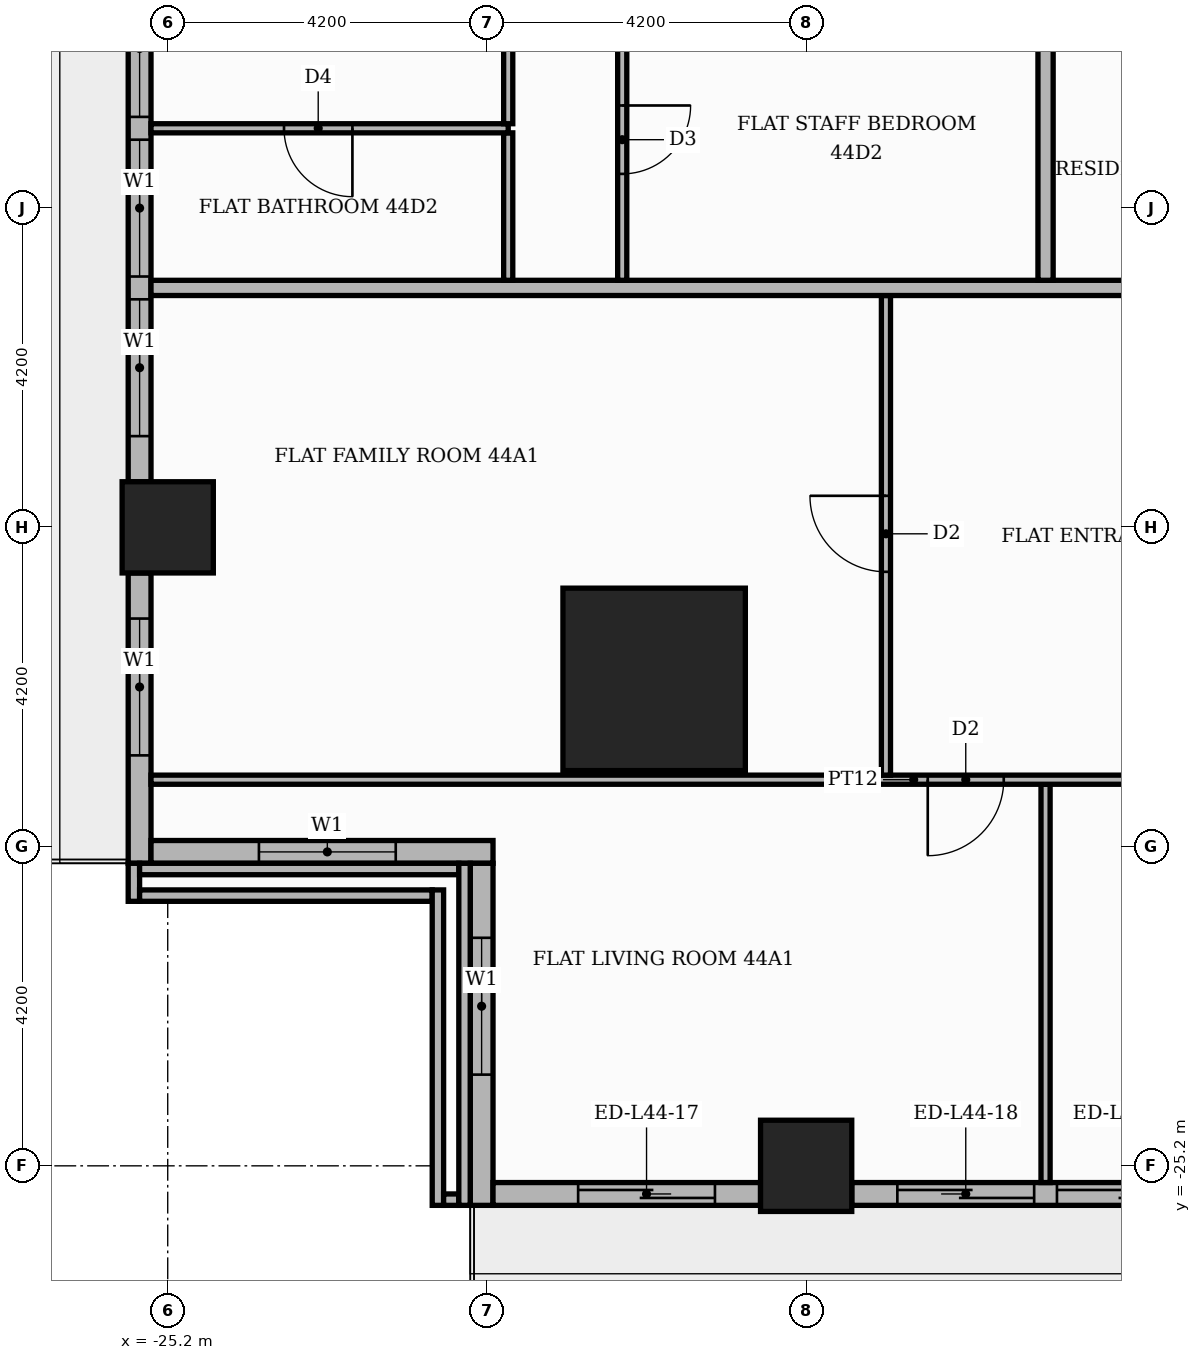
"""IFC4 building model, lengths in metres.
Left out: names, types, materials, properties, quantities, classifications, styles, units other than length and angle.
Written with IfcOpenShell. Run it as: python <this file> out.ifc"""

import sys

from ifc_helpers import new_model, si_unit, direction, frame, frame_2d, origin, origin_2d, place, context, subcontext, project, spatial, rectangle, extrude, element, fill, save


model = new_model("IFC4")
c1 = context("Model", 3, precision=1e-05, world=origin(), true_north=direction((0.0, 1.0)))
c2 = subcontext(c1, "Body", "Model", "MODEL_VIEW")
j1 = project(units=[si_unit("LENGTHUNIT", "METRE"), si_unit("PLANEANGLEUNIT", "RADIAN")], contexts=[c1])
p1 = place(None, origin())
s1 = spatial("IfcSite", under=j1, at=p1, CompositionType="ELEMENT")
p2 = place(p1, origin())
s2 = spatial("IfcBuilding", under=s1, at=p2, CompositionType="ELEMENT")
p3 = place(p2, frame((0.0, 0.0, 188.4)))
s3 = spatial("IfcBuildingStorey", under=s2, at=p3, CompositionType="ELEMENT", Elevation=188.4)
p4 = place(p3, frame((-18.8, -18.8, 0.0), z_axis=(0.0, 0.0, 1.0), x_axis=(1.0, 0.0, 0.0)))
e1 = element("IfcColumn", 1, at=p4, inside=s3, PredefinedType="COLUMN", context=c2, shape_type="SweptSolid", body=[
    extrude(rectangle(XDim=2.4, YDim=2.4, at=origin_2d()), origin(), (0.0, 0.0, 1.0), 3.9),
])
for number, where, z_axis, x_axis in (
    (2, (-16.8, -25.2, 0.0), (0.0, 0.0, 1.0), (1.0, 0.0, 0.0)),
    (3, (-25.2, -16.8, 0.0), (0.0, 0.0, 1.0), (1.0, 0.0, 0.0)),
):
    element("IfcColumn", number, at=place(p3, frame(where, z_axis=z_axis, x_axis=x_axis)), inside=s3, PredefinedType="COLUMN", context=c2, shape_type="SweptSolid", body=[
        extrude(rectangle(XDim=1.2, YDim=1.2, at=origin_2d()), origin(), (0.0, 0.0, 1.0), 3.9),
    ])
p5 = place(p3, frame((-25.57, -9.0, 0.0), z_axis=(0.0, 0.0, 1.0), x_axis=(0.0, -1.0, 0.0)))
e4 = element("IfcWall", 4, at=p5, inside=s3, PredefinedType="STANDARD", context=c2, shape_type="SweptSolid", body=[
    extrude(rectangle(XDim=7.2, YDim=0.3, at=frame_2d((3.6, 0.0))), origin(), (0.0, 0.0, 1.0), 3.48),
])
p6 = place(p5, frame((0.6, 0.0, 0.9)))
e5 = element("IfcOpeningElement", 5, at=p6, cuts=e4, PredefinedType="OPENING", context=c2, shape_type="SweptSolid", body=[
    extrude(rectangle(XDim=1.8, YDim=2.1, at=frame_2d((0.9, 1.05))), frame((0.0, 0.16, 0.0), z_axis=(0.0, -1.0, 0.0), x_axis=(1.0, 0.0, 0.0)), (0.0, 0.0, 1.0), 0.32),
])
p7 = place(p5, frame((2.7, 0.0, 0.9)))
e6 = element("IfcOpeningElement", 6, at=p7, cuts=e4, PredefinedType="OPENING", context=c2, shape_type="SweptSolid", body=[
    extrude(rectangle(XDim=1.8, YDim=2.1, at=frame_2d((0.9, 1.05))), frame((0.0, 0.16, 0.0), z_axis=(0.0, -1.0, 0.0), x_axis=(1.0, 0.0, 0.0)), (0.0, 0.0, 1.0), 0.32),
])
p8 = place(p5, frame((4.8, 0.0, 0.9)))
e7 = element("IfcOpeningElement", 7, at=p8, cuts=e4, PredefinedType="OPENING", context=c2, shape_type="SweptSolid", body=[
    extrude(rectangle(XDim=1.8, YDim=2.1, at=frame_2d((0.9, 1.05))), frame((0.0, 0.16, 0.0), z_axis=(0.0, -1.0, 0.0), x_axis=(1.0, 0.0, 0.0)), (0.0, 0.0, 1.0), 0.32),
])
p9 = place(p3, frame((-25.57, -17.4, 0.0), z_axis=(0.0, 0.0, 1.0), x_axis=(0.0, -1.0, 0.0)))
e8 = element("IfcWall", 8, at=p9, inside=s3, PredefinedType="STANDARD", context=c2, shape_type="SweptSolid", body=[
    extrude(rectangle(XDim=3.82, YDim=0.3, at=frame_2d((1.91, 0.0))), origin(), (0.0, 0.0, 1.0), 3.48),
])
p10 = place(p9, frame((0.6, 0.0, 0.9)))
e9 = element("IfcOpeningElement", 9, at=p10, cuts=e8, PredefinedType="OPENING", context=c2, shape_type="SweptSolid", body=[
    extrude(rectangle(XDim=1.8, YDim=2.1, at=frame_2d((0.9, 1.05))), frame((0.0, 0.16, 0.0), z_axis=(0.0, -1.0, 0.0), x_axis=(1.0, 0.0, 0.0)), (0.0, 0.0, 1.0), 0.32),
])
p11 = place(p3, frame((-25.42, -21.07, 0.0), z_axis=(0.0, 0.0, 1.0), x_axis=(1.0, 0.0, 0.0)))
e10 = element("IfcWall", 10, at=p11, inside=s3, PredefinedType="STANDARD", context=c2, shape_type="SweptSolid", body=[
    extrude(rectangle(XDim=4.5, YDim=0.3, at=frame_2d((2.25, 0.0))), origin(), (0.0, 0.0, 1.0), 3.48),
])
p12 = place(p11, frame((1.42, 0.0, 0.9)))
e11 = element("IfcOpeningElement", 11, at=p12, cuts=e10, PredefinedType="OPENING", context=c2, shape_type="SweptSolid", body=[
    extrude(rectangle(XDim=1.8, YDim=2.1, at=frame_2d((0.9, 1.05))), frame((0.0, 0.16, 0.0), z_axis=(0.0, -1.0, 0.0), x_axis=(1.0, 0.0, 0.0)), (0.0, 0.0, 1.0), 0.32),
])
p13 = place(p3, frame((-21.07, -21.22, 0.0), z_axis=(0.0, 0.0, 1.0), x_axis=(0.0, -1.0, 0.0)))
e12 = element("IfcWall", 12, at=p13, inside=s3, PredefinedType="STANDARD", context=c2, shape_type="SweptSolid", body=[
    extrude(rectangle(XDim=4.5, YDim=0.3, at=frame_2d((2.25, 0.0))), origin(), (0.0, 0.0, 1.0), 3.48),
])
p14 = place(p13, frame((0.98, 0.0, 0.9)))
e13 = element("IfcOpeningElement", 13, at=p14, cuts=e12, PredefinedType="OPENING", context=c2, shape_type="SweptSolid", body=[
    extrude(rectangle(XDim=1.8, YDim=2.1, at=frame_2d((0.9, 1.05))), frame((0.0, 0.16, 0.0), z_axis=(0.0, -1.0, 0.0), x_axis=(1.0, 0.0, 0.0)), (0.0, 0.0, 1.0), 0.32),
])
p15 = place(p3, frame((-20.92, -25.57, 0.0), z_axis=(0.0, 0.0, 1.0), x_axis=(1.0, 0.0, 0.0)))
e14 = element("IfcWall", 14, at=p15, inside=s3, PredefinedType="STANDARD", context=c2, shape_type="SweptSolid", body=[
    extrude(rectangle(XDim=3.52, YDim=0.3, at=frame_2d((1.76, 0.0))), origin(), (0.0, 0.0, 1.0), 3.48),
])
p16 = place(p15, frame((1.12, 0.0, 0.0)))
e15 = element("IfcOpeningElement", 15, at=p16, cuts=e14, PredefinedType="OPENING", context=c2, shape_type="SweptSolid", body=[
    extrude(rectangle(XDim=1.8, YDim=2.4, at=frame_2d((0.9, 1.2))), frame((0.0, 0.16, 0.0), z_axis=(0.0, -1.0, 0.0), x_axis=(1.0, 0.0, 0.0)), (0.0, 0.0, 1.0), 0.32),
])
p17 = place(p3, frame((-16.2, -25.57, 0.0), z_axis=(0.0, 0.0, 1.0), x_axis=(1.0, 0.0, 0.0)))
e16 = element("IfcWall", 16, at=p17, inside=s3, PredefinedType="STANDARD", context=c2, shape_type="SweptSolid", body=[
    extrude(rectangle(XDim=7.2, YDim=0.3, at=frame_2d((3.6, 0.0))), origin(), (0.0, 0.0, 1.0), 3.48),
])
p18 = place(p17, frame((0.6, 0.0, 0.0)))
e17 = element("IfcOpeningElement", 17, at=p18, cuts=e16, PredefinedType="OPENING", context=c2, shape_type="SweptSolid", body=[
    extrude(rectangle(XDim=1.8, YDim=2.4, at=frame_2d((0.9, 1.2))), frame((0.0, 0.16, 0.0), z_axis=(0.0, -1.0, 0.0), x_axis=(1.0, 0.0, 0.0)), (0.0, 0.0, 1.0), 0.32),
])
p19 = place(p17, frame((2.7, 0.0, 0.0)))
e18 = element("IfcOpeningElement", 18, at=p19, cuts=e16, PredefinedType="OPENING", context=c2, shape_type="SweptSolid", body=[
    extrude(rectangle(XDim=1.8, YDim=2.4, at=frame_2d((0.9, 1.2))), frame((0.0, 0.16, 0.0), z_axis=(0.0, -1.0, 0.0), x_axis=(1.0, 0.0, 0.0)), (0.0, 0.0, 1.0), 0.32),
])
p20 = place(p17, frame((4.8, 0.0, 0.9)))
e19 = element("IfcOpeningElement", 19, at=p20, cuts=e16, PredefinedType="OPENING", context=c2, shape_type="SweptSolid", body=[
    extrude(rectangle(XDim=1.8, YDim=2.1, at=frame_2d((0.9, 1.05))), frame((0.0, 0.16, 0.0), z_axis=(0.0, -1.0, 0.0), x_axis=(1.0, 0.0, 0.0)), (0.0, 0.0, 1.0), 0.32),
])
p21 = place(p3, frame((-25.645, -21.72, 0.0), z_axis=(0.0, 0.0, 1.0), x_axis=(0.0, 1.0, 0.0)))
e20 = element("IfcWall", 20, at=p21, inside=s3, PredefinedType="PARAPET", context=c2, shape_type="SweptSolid", body=[
    extrude(rectangle(XDim=0.5, YDim=0.15, at=frame_2d((0.25, 0.0))), origin(), (0.0, 0.0, 1.0), 1.1),
])
p22 = place(p3, frame((-25.57, -21.645, 0.0), z_axis=(0.0, 0.0, 1.0), x_axis=(1.0, 0.0, 0.0)))
e21 = element("IfcWall", 21, at=p22, inside=s3, PredefinedType="PARAPET", context=c2, shape_type="SweptSolid", body=[
    extrude(rectangle(XDim=3.85, YDim=0.15, at=frame_2d((1.925, 0.0))), origin(), (0.0, 0.0, 1.0), 1.1),
])
p23 = place(p3, frame((-25.57, -21.295, 0.0), z_axis=(0.0, 0.0, 1.0), x_axis=(1.0, 0.0, 0.0)))
e22 = element("IfcWall", 22, at=p23, inside=s3, PredefinedType="PARAPET", context=c2, shape_type="SweptSolid", body=[
    extrude(rectangle(XDim=4.2, YDim=0.15, at=frame_2d((2.1, 0.0))), origin(), (0.0, 0.0, 1.0), 1.1),
])
p24 = place(p3, frame((-21.645, -25.72, 0.0), z_axis=(0.0, 0.0, 1.0), x_axis=(0.0, 1.0, 0.0)))
e23 = element("IfcWall", 23, at=p24, inside=s3, PredefinedType="PARAPET", context=c2, shape_type="SweptSolid", body=[
    extrude(rectangle(XDim=4.15, YDim=0.15, at=frame_2d((2.075, 0.0))), origin(), (0.0, 0.0, 1.0), 1.1),
])
p25 = place(p3, frame((-21.57, -25.645, 0.0), z_axis=(0.0, 0.0, 1.0), x_axis=(1.0, 0.0, 0.0)))
e24 = element("IfcWall", 24, at=p25, inside=s3, PredefinedType="PARAPET", context=c2, shape_type="SweptSolid", body=[
    extrude(rectangle(XDim=0.2, YDim=0.15, at=frame_2d((0.1, 0.0))), origin(), (0.0, 0.0, 1.0), 1.1),
])
p26 = place(p3, frame((-21.295, -25.72, 0.0), z_axis=(0.0, 0.0, 1.0), x_axis=(0.0, 1.0, 0.0)))
e25 = element("IfcWall", 25, at=p26, inside=s3, PredefinedType="PARAPET", context=c2, shape_type="SweptSolid", body=[
    extrude(rectangle(XDim=4.5, YDim=0.15, at=frame_2d((2.25, 0.0))), origin(), (0.0, 0.0, 1.0), 1.1),
])
p27 = place(p3, frame((-13.65, -25.42, 0.0), z_axis=(0.0, 0.0, 1.0), x_axis=(0.0, 1.0, 0.0)))
e26 = element("IfcWall", 26, at=p27, inside=s3, PredefinedType="PARTITIONING", context=c2, shape_type="SweptSolid", body=[
    extrude(rectangle(XDim=5.24, YDim=0.12, at=frame_2d((2.62, 0.0))), origin(), (0.0, 0.0, 1.0), 3.48),
])
p28 = place(p3, frame((-25.42, -20.12, 0.0), z_axis=(0.0, 0.0, 1.0), x_axis=(1.0, 0.0, 0.0)))
e27 = element("IfcWall", 27, at=p28, inside=s3, PredefinedType="PARTITIONING", context=c2, shape_type="SweptSolid", body=[
    extrude(rectangle(XDim=20.07, YDim=0.12, at=frame_2d((10.035, 0.0))), origin(), (0.0, 0.0, 1.0), 3.48),
])
p29 = place(p28, frame((10.22, 0.0, 0.0)))
e28 = element("IfcOpeningElement", 28, at=p29, cuts=e27, PredefinedType="OPENING", context=c2, shape_type="SweptSolid", body=[
    extrude(rectangle(XDim=1.0, YDim=2.1, at=frame_2d((0.5, 1.05))), frame((0.0, 0.07, 0.0), z_axis=(0.0, -1.0, 0.0), x_axis=(1.0, 0.0, 0.0)), (0.0, 0.0, 1.0), 0.14),
])
p30 = place(p28, frame((13.42, 0.0, 0.0)))
e29 = element("IfcOpeningElement", 29, at=p30, cuts=e27, PredefinedType="OPENING", context=c2, shape_type="SweptSolid", body=[
    extrude(rectangle(XDim=0.9, YDim=2.1, at=frame_2d((0.45, 1.05))), frame((0.0, 0.07, 0.0), z_axis=(0.0, -1.0, 0.0), x_axis=(1.0, 0.0, 0.0)), (0.0, 0.0, 1.0), 0.14),
])
p31 = place(p3, frame((-15.75, -20.06, 0.0), z_axis=(0.0, 0.0, 1.0), x_axis=(0.0, 1.0, 0.0)))
e30 = element("IfcWall", 30, at=p31, inside=s3, PredefinedType="PARTITIONING", context=c2, shape_type="SweptSolid", body=[
    extrude(rectangle(XDim=6.31, YDim=0.12, at=frame_2d((3.155, 0.0))), origin(), (0.0, 0.0, 1.0), 3.48),
])
p32 = place(p31, frame((2.675, 0.0, 0.0)))
e31 = element("IfcOpeningElement", 31, at=p32, cuts=e30, PredefinedType="OPENING", context=c2, shape_type="SweptSolid", body=[
    extrude(rectangle(XDim=1.0, YDim=2.1, at=frame_2d((0.5, 1.05))), frame((0.0, 0.07, 0.0), z_axis=(0.0, -1.0, 0.0), x_axis=(1.0, 0.0, 0.0)), (0.0, 0.0, 1.0), 0.14),
])
p33 = place(p3, frame((-25.42, -13.65, 0.0), z_axis=(0.0, 0.0, 1.0), x_axis=(1.0, 0.0, 0.0)))
e32 = element("IfcWall", 32, at=p33, inside=s3, PredefinedType="PARTITIONING", context=c2, shape_type="SweptSolid", body=[
    extrude(rectangle(XDim=39.07, YDim=0.2, at=frame_2d((19.535, 0.0))), origin(), (0.0, 0.0, 1.0), 3.48),
])
p34 = place(p33, frame((13.32, 0.0, 0.0)))
e33 = element("IfcOpeningElement", 33, at=p34, cuts=e32, PredefinedType="OPENING", context=c2, shape_type="SweptSolid", body=[
    extrude(rectangle(XDim=1.1, YDim=2.4, at=frame_2d((0.55, 1.2))), frame((0.0, 0.11, 0.0), z_axis=(0.0, -1.0, 0.0), x_axis=(1.0, 0.0, 0.0)), (0.0, 0.0, 1.0), 0.22),
])
p35 = place(p33, frame((21.72, 0.0, 0.0)))
e34 = element("IfcOpeningElement", 34, at=p35, cuts=e32, PredefinedType="OPENING", context=c2, shape_type="SweptSolid", body=[
    extrude(rectangle(XDim=1.1, YDim=2.4, at=frame_2d((0.55, 1.2))), frame((0.0, 0.11, 0.0), z_axis=(0.0, -1.0, 0.0), x_axis=(1.0, 0.0, 0.0)), (0.0, 0.0, 1.0), 0.22),
])
p36 = place(p3, frame((-20.72, -13.55, 0.0), z_axis=(0.0, 0.0, 1.0), x_axis=(0.0, 1.0, 0.0)))
e35 = element("IfcWall", 35, at=p36, inside=s3, PredefinedType="PARTITIONING", context=c2, shape_type="SweptSolid", body=[
    extrude(rectangle(XDim=1.94, YDim=0.12, at=frame_2d((0.97, 0.0))), origin(), (0.0, 0.0, 1.0), 3.48),
])
p37 = place(p3, frame((-19.22, -13.55, 0.0), z_axis=(0.0, 0.0, 1.0), x_axis=(0.0, 1.0, 0.0)))
e36 = element("IfcWall", 36, at=p37, inside=s3, PredefinedType="PARTITIONING", context=c2, shape_type="SweptSolid", body=[
    extrude(rectangle(XDim=3.74, YDim=0.12, at=frame_2d((1.87, 0.0))), origin(), (0.0, 0.0, 1.0), 3.48),
])
p38 = place(p37, frame((1.4, 0.0, 0.0)))
e37 = element("IfcOpeningElement", 37, at=p38, cuts=e36, PredefinedType="OPENING", context=c2, shape_type="SweptSolid", body=[
    extrude(rectangle(XDim=0.9, YDim=2.1, at=frame_2d((0.45, 1.05))), frame((0.0, 0.07, 0.0), z_axis=(0.0, -1.0, 0.0), x_axis=(1.0, 0.0, 0.0)), (0.0, 0.0, 1.0), 0.14),
])
p39 = place(p3, frame((-13.65, -13.55, 0.0), z_axis=(0.0, 0.0, 1.0), x_axis=(0.0, 1.0, 0.0)))
e38 = element("IfcWall", 38, at=p39, inside=s3, PredefinedType="PARTITIONING", context=c2, shape_type="SweptSolid", body=[
    extrude(rectangle(XDim=18.7, YDim=0.2, at=frame_2d((9.35, 0.0))), origin(), (0.0, 0.0, 1.0), 3.48),
])
p40 = place(p39, frame((14.05, 0.0, 0.0)))
e39 = element("IfcOpeningElement", 39, at=p40, cuts=e38, PredefinedType="OPENING", context=c2, shape_type="SweptSolid", body=[
    extrude(rectangle(XDim=1.1, YDim=2.4, at=frame_2d((0.55, 1.2))), frame((0.0, 0.11, 0.0), z_axis=(0.0, -1.0, 0.0), x_axis=(1.0, 0.0, 0.0)), (0.0, 0.0, 1.0), 0.22),
])
p41 = place(p3, frame((-25.42, -11.55, 0.0), z_axis=(0.0, 0.0, 1.0), x_axis=(1.0, 0.0, 0.0)))
e40 = element("IfcWall", 40, at=p41, inside=s3, PredefinedType="PARTITIONING", context=c2, shape_type="SweptSolid", body=[
    extrude(rectangle(XDim=4.7, YDim=0.12, at=frame_2d((2.35, 0.0))), origin(), (0.0, 0.0, 1.0), 3.48),
])
p42 = place(p41, frame((1.75, 0.0, 0.0)))
e41 = element("IfcOpeningElement", 41, at=p42, cuts=e40, PredefinedType="OPENING", context=c2, shape_type="SweptSolid", body=[
    extrude(rectangle(XDim=0.9, YDim=2.1, at=frame_2d((0.45, 1.05))), frame((0.0, 0.07, 0.0), z_axis=(0.0, -1.0, 0.0), x_axis=(1.0, 0.0, 0.0)), (0.0, 0.0, 1.0), 0.14),
])
p43 = place(p3, frame((-20.72, -11.49, 0.0), z_axis=(0.0, 0.0, 1.0), x_axis=(0.0, 1.0, 0.0)))
e42 = element("IfcWall", 42, at=p43, inside=s3, PredefinedType="PARTITIONING", context=c2, shape_type="SweptSolid", body=[
    extrude(rectangle(XDim=1.98, YDim=0.12, at=frame_2d((0.99, 0.0))), origin(), (0.0, 0.0, 1.0), 3.48),
])
p44 = place(p6, origin())
e43 = element("IfcWindow", 43, at=p44, inside=s3, PartitioningType="SINGLE_PANEL", PredefinedType="WINDOW", context=c2, shape_type="SweptSolid", body=[
    extrude(rectangle(XDim=1.8, YDim=2.1, at=frame_2d((0.9, 1.05))), frame((0.0, 0.03, 0.0), z_axis=(0.0, -1.0, 0.0), x_axis=(1.0, 0.0, 0.0)), (0.0, 0.0, 1.0), 0.06),
])
fill(e5, e43)
p45 = place(p7, origin())
e44 = element("IfcWindow", 44, at=p45, inside=s3, PartitioningType="SINGLE_PANEL", PredefinedType="WINDOW", context=c2, shape_type="SweptSolid", body=[
    extrude(rectangle(XDim=1.8, YDim=2.1, at=frame_2d((0.9, 1.05))), frame((0.0, 0.03, 0.0), z_axis=(0.0, -1.0, 0.0), x_axis=(1.0, 0.0, 0.0)), (0.0, 0.0, 1.0), 0.06),
])
fill(e6, e44)
p46 = place(p8, origin())
e45 = element("IfcWindow", 45, at=p46, inside=s3, PartitioningType="SINGLE_PANEL", PredefinedType="WINDOW", context=c2, shape_type="SweptSolid", body=[
    extrude(rectangle(XDim=1.8, YDim=2.1, at=frame_2d((0.9, 1.05))), frame((0.0, 0.03, 0.0), z_axis=(0.0, -1.0, 0.0), x_axis=(1.0, 0.0, 0.0)), (0.0, 0.0, 1.0), 0.06),
])
fill(e7, e45)
p47 = place(p10, origin())
e46 = element("IfcWindow", 46, at=p47, inside=s3, PartitioningType="SINGLE_PANEL", PredefinedType="WINDOW", context=c2, shape_type="SweptSolid", body=[
    extrude(rectangle(XDim=1.8, YDim=2.1, at=frame_2d((0.9, 1.05))), frame((0.0, 0.03, 0.0), z_axis=(0.0, -1.0, 0.0), x_axis=(1.0, 0.0, 0.0)), (0.0, 0.0, 1.0), 0.06),
])
fill(e9, e46)
p48 = place(p12, origin())
e47 = element("IfcWindow", 47, at=p48, inside=s3, PartitioningType="SINGLE_PANEL", PredefinedType="WINDOW", context=c2, shape_type="SweptSolid", body=[
    extrude(rectangle(XDim=1.8, YDim=2.1, at=frame_2d((0.9, 1.05))), frame((0.0, 0.03, 0.0), z_axis=(0.0, -1.0, 0.0), x_axis=(1.0, 0.0, 0.0)), (0.0, 0.0, 1.0), 0.06),
])
fill(e11, e47)
p49 = place(p14, origin())
e48 = element("IfcWindow", 48, at=p49, inside=s3, PartitioningType="SINGLE_PANEL", PredefinedType="WINDOW", context=c2, shape_type="SweptSolid", body=[
    extrude(rectangle(XDim=1.8, YDim=2.1, at=frame_2d((0.9, 1.05))), frame((0.0, 0.03, 0.0), z_axis=(0.0, -1.0, 0.0), x_axis=(1.0, 0.0, 0.0)), (0.0, 0.0, 1.0), 0.06),
])
fill(e13, e48)
p50 = place(p16, origin())
e49 = element("IfcDoor", 49, at=p50, inside=s3, OperationType="SLIDING_TO_RIGHT", PredefinedType="DOOR", context=c2, shape_type="SweptSolid", body=[
    extrude(rectangle(XDim=1.8, YDim=2.4, at=frame_2d((0.9, 1.2))), frame((0.0, 0.025, 0.0), z_axis=(0.0, -1.0, 0.0), x_axis=(1.0, 0.0, 0.0)), (0.0, 0.0, 1.0), 0.05),
])
fill(e15, e49)
p51 = place(p18, origin())
e50 = element("IfcDoor", 50, at=p51, inside=s3, OperationType="SLIDING_TO_LEFT", PredefinedType="DOOR", context=c2, shape_type="SweptSolid", body=[
    extrude(rectangle(XDim=1.8, YDim=2.4, at=frame_2d((0.9, 1.2))), frame((0.0, 0.025, 0.0), z_axis=(0.0, -1.0, 0.0), x_axis=(1.0, 0.0, 0.0)), (0.0, 0.0, 1.0), 0.05),
])
fill(e17, e50)
p52 = place(p19, origin())
e51 = element("IfcDoor", 51, at=p52, inside=s3, OperationType="SLIDING_TO_RIGHT", PredefinedType="DOOR", context=c2, shape_type="SweptSolid", body=[
    extrude(rectangle(XDim=1.8, YDim=2.4, at=frame_2d((0.9, 1.2))), frame((0.0, 0.025, 0.0), z_axis=(0.0, -1.0, 0.0), x_axis=(1.0, 0.0, 0.0)), (0.0, 0.0, 1.0), 0.05),
])
fill(e18, e51)
p53 = place(p32, origin())
e52 = element("IfcDoor", 52, at=p53, inside=s3, OperationType="SINGLE_SWING_RIGHT", PredefinedType="DOOR", context=c2, shape_type="SweptSolid", body=[
    extrude(rectangle(XDim=1.0, YDim=2.1, at=frame_2d((0.5, 1.05))), frame((0.0, 0.025, 0.0), z_axis=(0.0, -1.0, 0.0), x_axis=(1.0, 0.0, 0.0)), (0.0, 0.0, 1.0), 0.05),
])
fill(e31, e52)
p54 = place(p29, frame((1.0, 0.0, 0.0), z_axis=(0.0, 0.0, 1.0), x_axis=(-1.0, 0.0, 0.0)))
e53 = element("IfcDoor", 53, at=p54, inside=s3, OperationType="SINGLE_SWING_LEFT", PredefinedType="DOOR", context=c2, shape_type="SweptSolid", body=[
    extrude(rectangle(XDim=1.0, YDim=2.1, at=frame_2d((0.5, 1.05))), frame((0.0, 0.025, 0.0), z_axis=(0.0, -1.0, 0.0), x_axis=(1.0, 0.0, 0.0)), (0.0, 0.0, 1.0), 0.05),
])
fill(e28, e53)
p55 = place(p38, frame((0.9, 0.0, 0.0), z_axis=(0.0, 0.0, 1.0), x_axis=(-1.0, 0.0, 0.0)))
e54 = element("IfcDoor", 54, at=p55, inside=s3, OperationType="SINGLE_SWING_RIGHT", PredefinedType="DOOR", context=c2, shape_type="SweptSolid", body=[
    extrude(rectangle(XDim=0.9, YDim=2.1, at=frame_2d((0.45, 1.05))), frame((0.0, 0.025, 0.0), z_axis=(0.0, -1.0, 0.0), x_axis=(1.0, 0.0, 0.0)), (0.0, 0.0, 1.0), 0.05),
])
fill(e37, e54)
p56 = place(p42, frame((0.9, 0.0, 0.0), z_axis=(0.0, 0.0, 1.0), x_axis=(-1.0, 0.0, 0.0)))
e55 = element("IfcDoor", 55, at=p56, inside=s3, OperationType="SINGLE_SWING_RIGHT", PredefinedType="DOOR", context=c2, shape_type="SweptSolid", body=[
    extrude(rectangle(XDim=0.9, YDim=2.1, at=frame_2d((0.45, 1.05))), frame((0.0, 0.025, 0.0), z_axis=(0.0, -1.0, 0.0), x_axis=(1.0, 0.0, 0.0)), (0.0, 0.0, 1.0), 0.05),
])
fill(e41, e55)
save(model, sys.argv[1])
